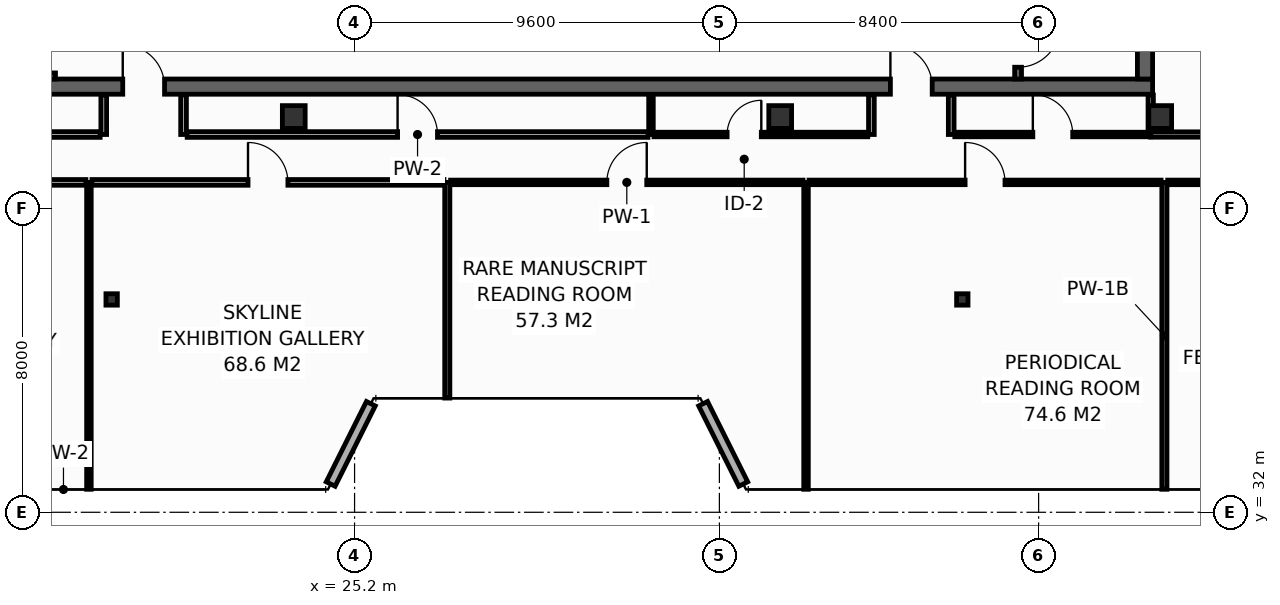
"""IFC4 building model, lengths in metres.
Left out: names, types, materials, properties, quantities, classifications, styles, units other than length and angle.
Written with IfcOpenShell. Run it as: python <this file> out.ifc"""

import sys

from ifc_helpers import new_model, si_unit, direction, frame, frame_2d, origin, origin_2d, place, context, subcontext, project, spatial, rectangle, hollow_rectangle, extrude, element, fill, save


model = new_model("IFC4")
c1 = context("Model", 3, precision=1e-05, world=origin(), true_north=direction((0.0, 1.0)))
c2 = subcontext(c1, "Body", "Model", "MODEL_VIEW")
j1 = project(units=[si_unit("LENGTHUNIT", "METRE"), si_unit("PLANEANGLEUNIT", "RADIAN")], contexts=[c1])
p1 = place(None, origin())
s1 = spatial("IfcSite", under=j1, at=p1, CompositionType="ELEMENT")
p2 = place(p1, origin())
s2 = spatial("IfcBuilding", under=s1, at=p2, CompositionType="ELEMENT")
p3 = place(p2, frame((0.0, 0.0, 299.0)))
s3 = spatial("IfcBuildingStorey", under=s2, at=p3, CompositionType="ELEMENT", Elevation=299.0)
p4 = place(p3, frame((13.7, 43.2, 0.0), z_axis=(0.0, 0.0, 1.0), x_axis=(1.0, 0.0, 0.0)))
e1 = element("IfcWall", 1, at=p4, inside=s3, PredefinedType="SHEAR", context=c2, shape_type="SweptSolid", body=[
    extrude(rectangle(XDim=32.5, YDim=0.4, at=frame_2d((16.25, 0.0))), origin(), (0.0, 0.0, 1.0), 3.55),
])
p5 = place(p4, frame((5.4, 0.0, 0.0)))
e2 = element("IfcOpeningElement", 2, at=p5, cuts=e1, PredefinedType="OPENING", context=c2, shape_type="SweptSolid", body=[
    extrude(rectangle(XDim=1.1, YDim=2.15, at=frame_2d((0.55, 1.075))), frame((0.0, 0.21, 0.0), z_axis=(0.0, -1.0, 0.0), x_axis=(1.0, 0.0, 0.0)), (0.0, 0.0, 1.0), 0.42),
])
p6 = place(p4, frame((25.6, 0.0, 0.0)))
e3 = element("IfcOpeningElement", 3, at=p6, cuts=e1, PredefinedType="OPENING", context=c2, shape_type="SweptSolid", body=[
    extrude(rectangle(XDim=1.1, YDim=2.15, at=frame_2d((0.55, 1.075))), frame((0.0, 0.21, 0.0), z_axis=(0.0, -1.0, 0.0), x_axis=(1.0, 0.0, 0.0)), (0.0, 0.0, 1.0), 0.42),
])
p7 = place(p3, frame((46.0, 43.4, 0.0), z_axis=(0.0, 0.0, 1.0), x_axis=(0.0, 1.0, 0.0)))
e4 = element("IfcWall", 4, at=p7, inside=s3, PredefinedType="SHEAR", context=c2, shape_type="SweptSolid", body=[
    extrude(rectangle(XDim=10.4, YDim=0.4, at=frame_2d((5.2, 0.0))), origin(), (0.0, 0.0, 1.0), 3.55),
])
for number, where, z_axis, x_axis in (
    (5, (23.6, 42.4, 0.0), (0.0, 0.0, 1.0), (1.0, 0.0, 0.0)),
    (6, (36.4, 42.4, 0.0), (0.0, 0.0, 1.0), (1.0, 0.0, 0.0)),
    (7, (46.4, 42.4, 0.0), (0.0, 0.0, 1.0), (1.0, 0.0, 0.0)),
):
    element("IfcColumn", number, at=place(p3, frame(where, z_axis=z_axis, x_axis=x_axis)), inside=s3, PredefinedType="COLUMN", context=c2, shape_type="SweptSolid", body=[
        extrude(hollow_rectangle(XDim=0.6, YDim=0.6, WallThickness=0.028, at=origin_2d()), origin(), (0.0, 0.0, 1.0), 3.8),
    ])
for number, where, z_axis, x_axis in (
    (8, (18.808, 37.6, 0.0), (0.0, 0.0, 1.0), (1.0, 0.0, 0.0)),
    (9, (41.192, 37.6, 0.0), (0.0, 0.0, 1.0), (1.0, 0.0, 0.0)),
):
    element("IfcColumn", number, at=place(p3, frame(where, z_axis=z_axis, x_axis=x_axis)), inside=s3, PredefinedType="COLUMN", context=c2, shape_type="SweptSolid", body=[
        extrude(hollow_rectangle(XDim=0.3, YDim=0.3, WallThickness=0.012, at=origin_2d()), origin(), (0.0, 0.0, 1.0), 3.8),
    ])
p8 = place(p3, frame((17.24, 43.4, 0.0), z_axis=(0.0, 0.0, 1.0), x_axis=(0.0, 1.0, 0.0)))
e10 = element("IfcWall", 10, at=p8, inside=s3, PredefinedType="SHEAR", context=c2, shape_type="SweptSolid", body=[
    extrude(rectangle(XDim=10.4, YDim=0.18, at=frame_2d((5.2, 0.0))), origin(), (0.0, 0.0, 1.0), 3.55),
])
p9 = place(p8, frame((0.16, 0.0, 0.0)))
e11 = element("IfcOpeningElement", 11, at=p9, cuts=e10, PredefinedType="OPENING", context=c2, shape_type="SweptSolid", body=[
    extrude(rectangle(XDim=1.0, YDim=2.15, at=frame_2d((0.5, 1.075))), frame((0.0, 0.1, 0.0), z_axis=(0.0, -1.0, 0.0), x_axis=(1.0, 0.0, 0.0)), (0.0, 0.0, 1.0), 0.2),
])
p10 = place(p3, frame((42.66, 53.8, 0.0), z_axis=(0.0, 0.0, 1.0), x_axis=(0.0, -1.0, 0.0)))
e12 = element("IfcWall", 12, at=p10, inside=s3, PredefinedType="SHEAR", context=c2, shape_type="SweptSolid", body=[
    extrude(rectangle(XDim=10.4, YDim=0.18, at=frame_2d((5.2, 0.0))), origin(), (0.0, 0.0, 1.0), 3.55),
])
p11 = place(p10, frame((8.99, 0.0, 0.0)))
e13 = element("IfcOpeningElement", 13, at=p11, cuts=e12, PredefinedType="OPENING", context=c2, shape_type="SweptSolid", body=[
    extrude(rectangle(XDim=1.1, YDim=2.15, at=frame_2d((0.55, 1.075))), frame((0.0, 0.1, 0.0), z_axis=(0.0, -1.0, 0.0), x_axis=(1.0, 0.0, 0.0)), (0.0, 0.0, 1.0), 0.2),
])
for number, where, z_axis, x_axis in (
    (14, (24.572, 32.743, 0.0), (0.0, 0.0, 1.0), (0.447, 0.894, 0.0)),
    (15, (34.372, 34.857, 0.0), (0.0, 0.0, 1.0), (0.447, -0.894, 0.0)),
):
    element("IfcWall", number, at=place(p3, frame(where, z_axis=z_axis, x_axis=x_axis)), inside=s3, PredefinedType="STANDARD", context=c2, shape_type="SweptSolid", body=[
        extrude(rectangle(XDim=2.363, YDim=0.26, at=frame_2d((1.182, 0.0))), origin(), (0.0, 0.0, 1.0), 3.55),
    ])
p12 = place(p3, frame((46.15, 41.94, 0.0), z_axis=(0.0, 0.0, 1.0), x_axis=(1.0, 0.0, 0.0)))
e16 = element("IfcWall", 16, at=p12, inside=s3, PredefinedType="PARTITIONING", context=c2, shape_type="SweptSolid", body=[
    extrude(rectangle(XDim=4.05, YDim=0.14, at=frame_2d((2.025, 0.0))), origin(), (0.0, 0.0, 1.0), 3.55),
])
p13 = place(p3, frame((46.15, 42.03, 0.0), z_axis=(0.0, 0.0, 1.0), x_axis=(0.0, 1.0, 0.0)))
e17 = element("IfcWall", 17, at=p13, inside=s3, PredefinedType="PARTITIONING", context=c2, shape_type="SweptSolid", body=[
    extrude(rectangle(XDim=0.95, YDim=0.14, at=frame_2d((0.475, 0.0))), origin(), (0.0, 0.0, 1.0), 3.55),
])
for number, where, z_axis, x_axis in (
    (18, (18.6, 41.94, 0.0), (0.0, 0.0, 1.0), (0.0, 1.0, 0.0)),
    (19, (20.7, 41.94, 0.0), (0.0, 0.0, 1.0), (0.0, 1.0, 0.0)),
    (20, (38.8, 41.94, 0.0), (0.0, 0.0, 1.0), (0.0, 1.0, 0.0)),
    (21, (40.9, 41.94, 0.0), (0.0, 0.0, 1.0), (0.0, 1.0, 0.0)),
):
    element("IfcWall", number, at=place(p3, frame(where, z_axis=z_axis, x_axis=x_axis)), inside=s3, PredefinedType="PARTITIONING", context=c2, shape_type="SweptSolid", body=[
        extrude(rectangle(XDim=1.04, YDim=0.15, at=frame_2d((0.52, 0.0))), origin(), (0.0, 0.0, 1.0), 3.55),
    ])
p14 = place(p3, frame((13.85, 41.94, 0.0), z_axis=(0.0, 0.0, 1.0), x_axis=(1.0, 0.0, 0.0)))
e22 = element("IfcWall", 22, at=p14, inside=s3, PredefinedType="PARTITIONING", context=c2, shape_type="SweptSolid", body=[
    extrude(rectangle(XDim=4.655, YDim=0.15, at=frame_2d((2.327, 0.0))), origin(), (0.0, 0.0, 1.0), 3.55),
])
p15 = place(p14, frame((1.802, 0.0, 0.0)))
e23 = element("IfcOpeningElement", 23, at=p15, cuts=e22, PredefinedType="OPENING", context=c2, shape_type="SweptSolid", body=[
    extrude(rectangle(XDim=1.05, YDim=2.15, at=frame_2d((0.525, 1.075))), frame((0.0, 0.085, 0.0), z_axis=(0.0, -1.0, 0.0), x_axis=(1.0, 0.0, 0.0)), (0.0, 0.0, 1.0), 0.17),
])
p16 = place(p3, frame((33.0, 41.94, 0.0), z_axis=(0.0, 0.0, 1.0), x_axis=(0.0, 1.0, 0.0)))
e24 = element("IfcWall", 24, at=p16, inside=s3, PredefinedType="PARTITIONING", context=c2, shape_type="SweptSolid", body=[
    extrude(rectangle(XDim=1.04, YDim=0.12, at=frame_2d((0.52, 0.0))), origin(), (0.0, 0.0, 1.0), 2.947),
])
p17 = place(p3, frame((20.795, 41.94, 0.0), z_axis=(0.0, 0.0, 1.0), x_axis=(1.0, 0.0, 0.0)))
e25 = element("IfcWall", 25, at=p17, inside=s3, PredefinedType="PARTITIONING", context=c2, shape_type="SweptSolid", body=[
    extrude(rectangle(XDim=12.125, YDim=0.15, at=frame_2d((6.062, 0.0))), origin(), (0.0, 0.0, 1.0), 3.047),
])
p18 = place(p17, frame((5.537, 0.0, 0.0)))
e26 = element("IfcOpeningElement", 26, at=p18, cuts=e25, PredefinedType="OPENING", context=c2, shape_type="SweptSolid", body=[
    extrude(rectangle(XDim=1.05, YDim=2.15, at=frame_2d((0.525, 1.075))), frame((0.0, 0.085, 0.0), z_axis=(0.0, -1.0, 0.0), x_axis=(1.0, 0.0, 0.0)), (0.0, 0.0, 1.0), 0.17),
])
p19 = place(p3, frame((33.08, 41.94, 0.0), z_axis=(0.0, 0.0, 1.0), x_axis=(1.0, 0.0, 0.0)))
e27 = element("IfcWall", 27, at=p19, inside=s3, PredefinedType="PARTITIONING", context=c2, shape_type="SweptSolid", body=[
    extrude(rectangle(XDim=5.625, YDim=0.12, at=frame_2d((2.812, 0.0))), origin(), (0.0, 0.0, 1.0), 3.047),
])
p20 = place(p19, frame((1.923, 0.0, 0.0)))
e28 = element("IfcOpeningElement", 28, at=p20, cuts=e27, PredefinedType="OPENING", context=c2, shape_type="SweptSolid", body=[
    extrude(rectangle(XDim=0.9, YDim=2.1, at=frame_2d((0.45, 1.05))), frame((0.0, 0.07, 0.0), z_axis=(0.0, -1.0, 0.0), x_axis=(1.0, 0.0, 0.0)), (0.0, 0.0, 1.0), 0.14),
])
p21 = place(p3, frame((40.995, 41.94, 0.0), z_axis=(0.0, 0.0, 1.0), x_axis=(1.0, 0.0, 0.0)))
e29 = element("IfcWall", 29, at=p21, inside=s3, PredefinedType="PARTITIONING", context=c2, shape_type="SweptSolid", body=[
    extrude(rectangle(XDim=5.155, YDim=0.12, at=frame_2d((2.577, 0.0))), origin(), (0.0, 0.0, 1.0), 3.55),
])
p22 = place(p21, frame((2.053, 0.0, 0.0)))
e30 = element("IfcOpeningElement", 30, at=p22, cuts=e29, PredefinedType="OPENING", context=c2, shape_type="SweptSolid", body=[
    extrude(rectangle(XDim=1.05, YDim=2.15, at=frame_2d((0.525, 1.075))), frame((0.0, 0.07, 0.0), z_axis=(0.0, -1.0, 0.0), x_axis=(1.0, 0.0, 0.0)), (0.0, 0.0, 1.0), 0.14),
])
p23 = place(p3, frame((18.21, 32.605, 0.0), z_axis=(0.0, 0.0, 1.0), x_axis=(0.0, 1.0, 0.0)))
e31 = element("IfcWall", 31, at=p23, inside=s3, PredefinedType="PARTITIONING", context=c2, shape_type="SweptSolid", body=[
    extrude(rectangle(XDim=8.075, YDim=0.12, at=frame_2d((4.038, 0.0))), origin(), (0.0, 0.0, 1.0), 3.047),
])
p24 = place(p3, frame((27.64, 35.005, 0.0), z_axis=(0.0, 0.0, 1.0), x_axis=(0.0, 1.0, 0.0)))
e32 = element("IfcWall", 32, at=p24, inside=s3, PredefinedType="PARTITIONING", context=c2, shape_type="SweptSolid", body=[
    extrude(rectangle(XDim=5.675, YDim=0.135, at=frame_2d((2.837, 0.0))), origin(), (0.0, 0.0, 1.0), 3.55),
])
p25 = place(p3, frame((37.08, 32.605, 0.0), z_axis=(0.0, 0.0, 1.0), x_axis=(0.0, 1.0, 0.0)))
e33 = element("IfcWall", 33, at=p25, inside=s3, PredefinedType="PARTITIONING", context=c2, shape_type="SweptSolid", body=[
    extrude(rectangle(XDim=8.075, YDim=0.12, at=frame_2d((4.038, 0.0))), origin(), (0.0, 0.0, 1.0), 3.55),
])
p26 = place(p3, frame((46.51, 32.605, 0.0), z_axis=(0.0, 0.0, 1.0), x_axis=(0.0, 1.0, 0.0)))
e34 = element("IfcWall", 34, at=p26, inside=s3, PredefinedType="PARTITIONING", context=c2, shape_type="SweptSolid", body=[
    extrude(rectangle(XDim=8.075, YDim=0.135, at=frame_2d((4.038, 0.0))), origin(), (0.0, 0.0, 1.0), 3.047),
])
p27 = place(p3, frame((6.415, 40.68, 0.0), z_axis=(0.0, 0.0, 1.0), x_axis=(1.0, 0.0, 0.0)))
e35 = element("IfcWall", 35, at=p27, inside=s3, PredefinedType="PARTITIONING", context=c2, shape_type="SweptSolid", body=[
    extrude(rectangle(XDim=11.715, YDim=0.15, at=frame_2d((5.857, 0.0))), origin(), (0.0, 0.0, 1.0), 3.085),
])
p28 = place(p27, frame((5.333, 0.0, 0.0)))
e36 = element("IfcOpeningElement", 36, at=p28, cuts=e35, PredefinedType="OPENING", context=c2, shape_type="SweptSolid", body=[
    extrude(rectangle(XDim=1.05, YDim=2.15, at=frame_2d((0.525, 1.075))), frame((0.0, 0.085, 0.0), z_axis=(0.0, -1.0, 0.0), x_axis=(1.0, 0.0, 0.0)), (0.0, 0.0, 1.0), 0.17),
])
p29 = place(p3, frame((18.29, 40.68, 0.0), z_axis=(0.0, 0.0, 1.0), x_axis=(1.0, 0.0, 0.0)))
e37 = element("IfcWall", 37, at=p29, inside=s3, PredefinedType="PARTITIONING", context=c2, shape_type="SweptSolid", body=[
    extrude(rectangle(XDim=9.262, YDim=0.15, at=frame_2d((4.631, 0.0))), origin(), (0.0, 0.0, 1.0), 3.047),
])
p30 = place(p29, frame((4.106, 0.0, 0.0)))
e38 = element("IfcOpeningElement", 38, at=p30, cuts=e37, PredefinedType="OPENING", context=c2, shape_type="SweptSolid", body=[
    extrude(rectangle(XDim=1.05, YDim=2.15, at=frame_2d((0.525, 1.075))), frame((0.0, 0.085, 0.0), z_axis=(0.0, -1.0, 0.0), x_axis=(1.0, 0.0, 0.0)), (0.0, 0.0, 1.0), 0.17),
])
p31 = place(p3, frame((27.728, 40.68, 0.0), z_axis=(0.0, 0.0, 1.0), x_axis=(1.0, 0.0, 0.0)))
e39 = element("IfcWall", 39, at=p31, inside=s3, PredefinedType="PARTITIONING", context=c2, shape_type="SweptSolid", body=[
    extrude(rectangle(XDim=9.272, YDim=0.12, at=frame_2d((4.636, 0.0))), origin(), (0.0, 0.0, 1.0), 3.55),
])
p32 = place(p31, frame((4.111, 0.0, 0.0)))
e40 = element("IfcOpeningElement", 40, at=p32, cuts=e39, PredefinedType="OPENING", context=c2, shape_type="SweptSolid", body=[
    extrude(rectangle(XDim=1.05, YDim=2.15, at=frame_2d((0.525, 1.075))), frame((0.0, 0.07, 0.0), z_axis=(0.0, -1.0, 0.0), x_axis=(1.0, 0.0, 0.0)), (0.0, 0.0, 1.0), 0.14),
])
p33 = place(p3, frame((37.16, 40.68, 0.0), z_axis=(0.0, 0.0, 1.0), x_axis=(1.0, 0.0, 0.0)))
e41 = element("IfcWall", 41, at=p33, inside=s3, PredefinedType="PARTITIONING", context=c2, shape_type="SweptSolid", body=[
    extrude(rectangle(XDim=9.263, YDim=0.12, at=frame_2d((4.631, 0.0))), origin(), (0.0, 0.0, 1.0), 3.047),
])
p34 = place(p33, frame((4.106, 0.0, 0.0)))
e42 = element("IfcOpeningElement", 42, at=p34, cuts=e41, PredefinedType="OPENING", context=c2, shape_type="SweptSolid", body=[
    extrude(rectangle(XDim=1.05, YDim=2.15, at=frame_2d((0.525, 1.075))), frame((0.0, 0.07, 0.0), z_axis=(0.0, -1.0, 0.0), x_axis=(1.0, 0.0, 0.0)), (0.0, 0.0, 1.0), 0.14),
])
p35 = place(p3, frame((46.597, 40.68, 0.0), z_axis=(0.0, 0.0, 1.0), x_axis=(1.0, 0.0, 0.0)))
e43 = element("IfcWall", 43, at=p35, inside=s3, PredefinedType="PARTITIONING", context=c2, shape_type="SweptSolid", body=[
    extrude(rectangle(XDim=6.988, YDim=0.12, at=frame_2d((3.494, 0.0))), origin(), (0.0, 0.0, 1.0), 3.085),
])
p36 = place(p35, frame((3.044, 0.0, 0.0)))
e44 = element("IfcOpeningElement", 44, at=p36, cuts=e43, PredefinedType="OPENING", context=c2, shape_type="SweptSolid", body=[
    extrude(rectangle(XDim=0.9, YDim=2.1, at=frame_2d((0.45, 1.05))), frame((0.0, 0.07, 0.0), z_axis=(0.0, -1.0, 0.0), x_axis=(1.0, 0.0, 0.0)), (0.0, 0.0, 1.0), 0.14),
])
p37 = place(p9, origin())
e45 = element("IfcDoor", 45, at=p37, inside=s3, OperationType="SINGLE_SWING_RIGHT", PredefinedType="DOOR", context=c2, shape_type="SweptSolid", body=[
    extrude(rectangle(XDim=1.0, YDim=2.15, at=frame_2d((0.5, 1.075))), frame((0.0, 0.025, 0.0), z_axis=(0.0, -1.0, 0.0), x_axis=(1.0, 0.0, 0.0)), (0.0, 0.0, 1.0), 0.05),
])
fill(e11, e45)
p38 = place(p11, origin())
e46 = element("IfcDoor", 46, at=p38, inside=s3, OperationType="SINGLE_SWING_LEFT", PredefinedType="DOOR", context=c2, shape_type="SweptSolid", body=[
    extrude(rectangle(XDim=1.1, YDim=2.15, at=frame_2d((0.55, 1.075))), frame((0.0, 0.025, 0.0), z_axis=(0.0, -1.0, 0.0), x_axis=(1.0, 0.0, 0.0)), (0.0, 0.0, 1.0), 0.05),
])
fill(e13, e46)
p39 = place(p5, origin())
e47 = element("IfcDoor", 47, at=p39, inside=s3, OperationType="SINGLE_SWING_LEFT", PredefinedType="DOOR", context=c2, shape_type="SweptSolid", body=[
    extrude(rectangle(XDim=1.1, YDim=2.15, at=frame_2d((0.55, 1.075))), frame((0.0, 0.025, 0.0), z_axis=(0.0, -1.0, 0.0), x_axis=(1.0, 0.0, 0.0)), (0.0, 0.0, 1.0), 0.05),
])
fill(e2, e47)
p40 = place(p6, origin())
e48 = element("IfcDoor", 48, at=p40, inside=s3, OperationType="SINGLE_SWING_LEFT", PredefinedType="DOOR", context=c2, shape_type="SweptSolid", body=[
    extrude(rectangle(XDim=1.1, YDim=2.15, at=frame_2d((0.55, 1.075))), frame((0.0, 0.025, 0.0), z_axis=(0.0, -1.0, 0.0), x_axis=(1.0, 0.0, 0.0)), (0.0, 0.0, 1.0), 0.05),
])
fill(e3, e48)
p41 = place(p18, origin())
e49 = element("IfcDoor", 49, at=p41, inside=s3, OperationType="SINGLE_SWING_LEFT", PredefinedType="DOOR", context=c2, shape_type="SweptSolid", body=[
    extrude(rectangle(XDim=1.05, YDim=2.15, at=frame_2d((0.525, 1.075))), frame((0.0, 0.025, 0.0), z_axis=(0.0, -1.0, 0.0), x_axis=(1.0, 0.0, 0.0)), (0.0, 0.0, 1.0), 0.05),
])
fill(e26, e49)
p42 = place(p20, origin())
e50 = element("IfcDoor", 50, at=p42, inside=s3, OperationType="SINGLE_SWING_RIGHT", PredefinedType="DOOR", context=c2, shape_type="SweptSolid", body=[
    extrude(rectangle(XDim=0.9, YDim=2.1, at=frame_2d((0.45, 1.05))), frame((0.0, 0.025, 0.0), z_axis=(0.0, -1.0, 0.0), x_axis=(1.0, 0.0, 0.0)), (0.0, 0.0, 1.0), 0.05),
])
fill(e28, e50)
p43 = place(p22, origin())
e51 = element("IfcDoor", 51, at=p43, inside=s3, OperationType="SINGLE_SWING_LEFT", PredefinedType="DOOR", context=c2, shape_type="SweptSolid", body=[
    extrude(rectangle(XDim=1.05, YDim=2.15, at=frame_2d((0.525, 1.075))), frame((0.0, 0.025, 0.0), z_axis=(0.0, -1.0, 0.0), x_axis=(1.0, 0.0, 0.0)), (0.0, 0.0, 1.0), 0.05),
])
fill(e30, e51)
p44 = place(p30, origin())
e52 = element("IfcDoor", 52, at=p44, inside=s3, OperationType="SINGLE_SWING_LEFT", PredefinedType="DOOR", context=c2, shape_type="SweptSolid", body=[
    extrude(rectangle(XDim=1.05, YDim=2.15, at=frame_2d((0.525, 1.075))), frame((0.0, 0.025, 0.0), z_axis=(0.0, -1.0, 0.0), x_axis=(1.0, 0.0, 0.0)), (0.0, 0.0, 1.0), 0.05),
])
fill(e38, e52)
p45 = place(p32, origin())
e53 = element("IfcDoor", 53, at=p45, inside=s3, OperationType="SINGLE_SWING_RIGHT", PredefinedType="DOOR", context=c2, shape_type="SweptSolid", body=[
    extrude(rectangle(XDim=1.05, YDim=2.15, at=frame_2d((0.525, 1.075))), frame((0.0, 0.025, 0.0), z_axis=(0.0, -1.0, 0.0), x_axis=(1.0, 0.0, 0.0)), (0.0, 0.0, 1.0), 0.05),
])
fill(e40, e53)
p46 = place(p34, origin())
e54 = element("IfcDoor", 54, at=p46, inside=s3, OperationType="SINGLE_SWING_LEFT", PredefinedType="DOOR", context=c2, shape_type="SweptSolid", body=[
    extrude(rectangle(XDim=1.05, YDim=2.15, at=frame_2d((0.525, 1.075))), frame((0.0, 0.025, 0.0), z_axis=(0.0, -1.0, 0.0), x_axis=(1.0, 0.0, 0.0)), (0.0, 0.0, 1.0), 0.05),
])
fill(e42, e54)
save(model, sys.argv[1])
